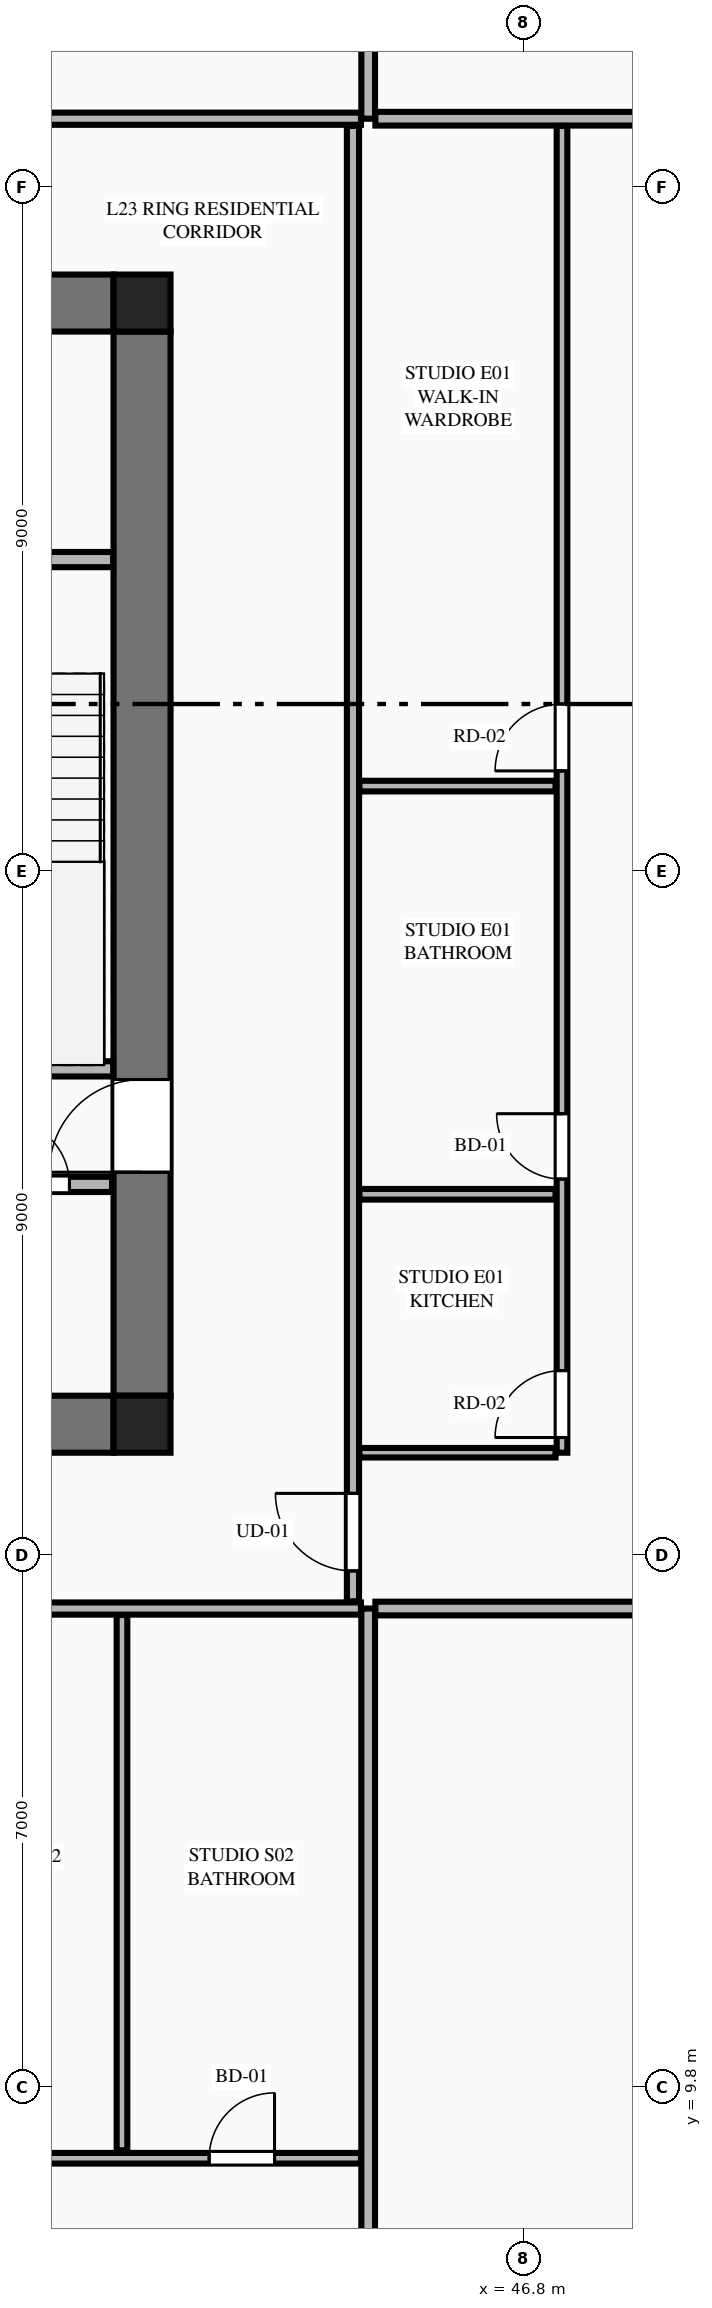
"""IFC4 building model, lengths in metres.
Left out: names, types, materials, properties, quantities, classifications, styles, units other than length and angle.
Written with IfcOpenShell. Run it as: python <this file> out.ifc"""

import sys

from ifc_helpers import new_model, si_unit, direction, frame, frame_2d, origin, origin_2d, place, context, subcontext, project, spatial, rectangle, extrude, element, fill, save


model = new_model("IFC4")
c1 = context("Model", 3, precision=1e-05, world=origin(), true_north=direction((0.0, 1.0)))
c2 = subcontext(c1, "Body", "Model", "MODEL_VIEW")
j1 = project(units=[si_unit("LENGTHUNIT", "METRE"), si_unit("PLANEANGLEUNIT", "RADIAN")], contexts=[c1])
p1 = place(None, origin())
s1 = spatial("IfcSite", under=j1, at=p1, CompositionType="ELEMENT")
p2 = place(p1, origin())
s2 = spatial("IfcBuilding", under=s1, at=p2, CompositionType="ELEMENT")
p3 = place(p2, frame((0.0, 0.0, 90.65)))
s3 = spatial("IfcBuildingStorey", under=s2, at=p3, CompositionType="ELEMENT", Elevation=90.65)
for number, where, z_axis, x_axis in (
    (1, (41.775, 18.525, 0.0), (0.0, 0.0, 1.0), (1.0, 0.0, 0.0)),
    (2, (41.775, 33.275, 0.0), (0.0, 0.0, 1.0), (1.0, 0.0, 0.0)),
):
    element("IfcColumn", number, at=place(p3, frame(where, z_axis=z_axis, x_axis=x_axis)), inside=s3, PredefinedType="COLUMN", context=c2, shape_type="SweptSolid", body=[
        extrude(rectangle(XDim=0.75, YDim=0.75, at=origin_2d()), origin(), (0.0, 0.0, 1.0), 3.55),
    ])
for number, where, z_axis, x_axis in (
    (3, (23.4, 18.525, 0.0), (0.0, 0.0, 1.0), (1.0, 0.0, 0.0)),
    (4, (23.4, 33.275, 0.0), (0.0, 0.0, 1.0), (1.0, 0.0, 0.0)),
):
    element("IfcWall", number, at=place(p3, frame(where, z_axis=z_axis, x_axis=x_axis)), inside=s3, PredefinedType="SHEAR", context=c2, shape_type="SweptSolid", body=[
        extrude(rectangle(XDim=18.0, YDim=0.75, at=frame_2d((9.0, 0.0))), origin(), (0.0, 0.0, 1.0), 3.33),
    ])
p4 = place(p3, frame((41.775, 18.9, 0.0), z_axis=(0.0, 0.0, 1.0), x_axis=(0.0, 1.0, 0.0)))
e5 = element("IfcWall", 5, at=p4, inside=s3, PredefinedType="SHEAR", context=c2, shape_type="SweptSolid", body=[
    extrude(rectangle(XDim=14.0, YDim=0.75, at=frame_2d((7.0, 0.0))), origin(), (0.0, 0.0, 1.0), 3.33),
])
p5 = place(p4, frame((2.94, 0.0, 0.0)))
e6 = element("IfcOpeningElement", 6, at=p5, cuts=e5, PredefinedType="OPENING", context=c2, shape_type="SweptSolid", body=[
    extrude(rectangle(XDim=1.22, YDim=2.25, at=frame_2d((0.61, 1.125))), frame((0.0, 0.385, 0.0), z_axis=(0.0, -1.0, 0.0), x_axis=(1.0, 0.0, 0.0)), (0.0, 0.0, 1.0), 0.77),
])
p6 = place(p3, frame((38.125, 23.2, 0.0), z_axis=(0.0, 0.0, 1.0), x_axis=(1.0, 0.0, 0.0)))
e7 = element("IfcWall", 7, at=p6, inside=s3, PredefinedType="PLUMBINGWALL", context=c2, shape_type="SweptSolid", body=[
    extrude(rectangle(XDim=3.27, YDim=0.2, at=frame_2d((1.635, 0.0))), origin(), (0.0, 0.0, 1.0), 3.33),
])
p7 = place(p3, frame((38.125, 29.9, 0.0), z_axis=(0.0, 0.0, 1.0), x_axis=(1.0, 0.0, 0.0)))
e8 = element("IfcWall", 8, at=p7, inside=s3, PredefinedType="PLUMBINGWALL", context=c2, shape_type="SweptSolid", body=[
    extrude(rectangle(XDim=3.27, YDim=0.2, at=frame_2d((1.635, 0.0))), origin(), (0.0, 0.0, 1.0), 3.33),
])
p8 = place(p7, frame((0.5, 0.0, 0.0)))
e9 = element("IfcOpeningElement", 9, at=p8, cuts=e8, PredefinedType="OPENING", context=c2, shape_type="SweptSolid", body=[
    extrude(rectangle(XDim=0.85, YDim=2.05, at=frame_2d((0.425, 1.025))), frame((0.0, 0.11, 0.0), z_axis=(0.0, -1.0, 0.0), x_axis=(1.0, 0.0, 0.0)), (0.0, 0.0, 1.0), 0.22),
])
p9 = place(p3, frame((23.42, 21.68, 0.0), z_axis=(0.0, 0.0, 1.0), x_axis=(1.0, 0.0, 0.0)))
e10 = element("IfcWall", 10, at=p9, inside=s3, PredefinedType="PLUMBINGWALL", context=c2, shape_type="SweptSolid", body=[
    extrude(rectangle(XDim=17.96, YDim=0.2, at=frame_2d((8.98, 0.0))), origin(), (0.0, 0.0, 1.0), 3.33),
])
p10 = place(p9, frame((4.45, 0.0, 0.0)))
e11 = element("IfcOpeningElement", 11, at=p10, cuts=e10, PredefinedType="OPENING", context=c2, shape_type="SweptSolid", body=[
    extrude(rectangle(XDim=1.1, YDim=2.2, at=frame_2d((0.55, 1.1))), frame((0.0, 0.11, 0.0), z_axis=(0.0, -1.0, 0.0), x_axis=(1.0, 0.0, 0.0)), (0.0, 0.0, 1.0), 0.22),
])
p11 = place(p9, frame((6.85, 0.0, 0.0)))
e12 = element("IfcOpeningElement", 12, at=p11, cuts=e10, PredefinedType="OPENING", context=c2, shape_type="SweptSolid", body=[
    extrude(rectangle(XDim=1.1, YDim=2.2, at=frame_2d((0.55, 1.1))), frame((0.0, 0.11, 0.0), z_axis=(0.0, -1.0, 0.0), x_axis=(1.0, 0.0, 0.0)), (0.0, 0.0, 1.0), 0.22),
])
p12 = place(p9, frame((9.25, 0.0, 0.0)))
e13 = element("IfcOpeningElement", 13, at=p12, cuts=e10, PredefinedType="OPENING", context=c2, shape_type="SweptSolid", body=[
    extrude(rectangle(XDim=1.1, YDim=2.2, at=frame_2d((0.55, 1.1))), frame((0.0, 0.11, 0.0), z_axis=(0.0, -1.0, 0.0), x_axis=(1.0, 0.0, 0.0)), (0.0, 0.0, 1.0), 0.22),
])
p13 = place(p9, frame((0.2, 0.0, 0.0)))
e14 = element("IfcOpeningElement", 14, at=p13, cuts=e10, PredefinedType="OPENING", context=c2, shape_type="SweptSolid", body=[
    extrude(rectangle(XDim=0.85, YDim=2.05, at=frame_2d((0.425, 1.025))), frame((0.0, 0.11, 0.0), z_axis=(0.0, -1.0, 0.0), x_axis=(1.0, 0.0, 0.0)), (0.0, 0.0, 1.0), 0.22),
])
p14 = place(p9, frame((2.05, 0.0, 0.0)))
e15 = element("IfcOpeningElement", 15, at=p14, cuts=e10, PredefinedType="OPENING", context=c2, shape_type="SweptSolid", body=[
    extrude(rectangle(XDim=0.85, YDim=2.05, at=frame_2d((0.425, 1.025))), frame((0.0, 0.11, 0.0), z_axis=(0.0, -1.0, 0.0), x_axis=(1.0, 0.0, 0.0)), (0.0, 0.0, 1.0), 0.22),
])
p15 = place(p9, frame((13.5, 0.0, 0.0)))
e16 = element("IfcOpeningElement", 16, at=p15, cuts=e10, PredefinedType="OPENING", context=c2, shape_type="SweptSolid", body=[
    extrude(rectangle(XDim=0.85, YDim=2.05, at=frame_2d((0.425, 1.025))), frame((0.0, 0.11, 0.0), z_axis=(0.0, -1.0, 0.0), x_axis=(1.0, 0.0, 0.0)), (0.0, 0.0, 1.0), 0.22),
])
p16 = place(p9, frame((15.05, 0.0, 0.0)))
e17 = element("IfcOpeningElement", 17, at=p16, cuts=e10, PredefinedType="OPENING", context=c2, shape_type="SweptSolid", body=[
    extrude(rectangle(XDim=0.85, YDim=2.05, at=frame_2d((0.425, 1.025))), frame((0.0, 0.11, 0.0), z_axis=(0.0, -1.0, 0.0), x_axis=(1.0, 0.0, 0.0)), (0.0, 0.0, 1.0), 0.22),
])
p17 = place(p9, frame((16.55, 0.0, 0.0)))
e18 = element("IfcOpeningElement", 18, at=p17, cuts=e10, PredefinedType="OPENING", context=c2, shape_type="SweptSolid", body=[
    extrude(rectangle(XDim=0.85, YDim=2.05, at=frame_2d((0.425, 1.025))), frame((0.0, 0.11, 0.0), z_axis=(0.0, -1.0, 0.0), x_axis=(1.0, 0.0, 0.0)), (0.0, 0.0, 1.0), 0.22),
])
p18 = place(p3, frame((44.75, 2.455, 0.0), z_axis=(0.0, 0.0, 1.0), x_axis=(0.0, 1.0, 0.0)))
e19 = element("IfcWall", 19, at=p18, inside=s3, PredefinedType="PARTITIONING", context=c2, shape_type="SweptSolid", body=[
    extrude(rectangle(XDim=13.645, YDim=0.18, at=frame_2d((6.823, 0.0))), origin(), (0.0, 0.0, 1.0), 3.33),
])
p19 = place(p3, frame((36.617, 16.1, 0.0), z_axis=(0.0, 0.0, 1.0), x_axis=(1.0, 0.0, 0.0)))
e20 = element("IfcWall", 20, at=p19, inside=s3, PredefinedType="PARTITIONING", context=c2, shape_type="SweptSolid", body=[
    extrude(rectangle(XDim=8.038, YDim=0.16, at=frame_2d((4.019, 0.0))), origin(), (0.0, 0.0, 1.0), 3.33),
])
p20 = place(p19, frame((0.355, 0.0, 0.0)))
e21 = element("IfcOpeningElement", 21, at=p20, cuts=e20, PredefinedType="OPENING", context=c2, shape_type="SweptSolid", body=[
    extrude(rectangle(XDim=1.02, YDim=2.25, at=frame_2d((0.51, 1.125))), frame((0.0, 0.09, 0.0), z_axis=(0.0, -1.0, 0.0), x_axis=(1.0, 0.0, 0.0)), (0.0, 0.0, 1.0), 0.18),
])
p21 = place(p3, frame((38.522, 8.868, 0.0), z_axis=(0.0, 0.0, 1.0), x_axis=(1.0, 0.0, 0.0)))
e22 = element("IfcWall", 22, at=p21, inside=s3, PredefinedType="PLUMBINGWALL", context=c2, shape_type="SweptSolid", body=[
    extrude(rectangle(XDim=6.133, YDim=0.14, at=frame_2d((3.066, 0.0))), origin(), (0.0, 0.0, 1.0), 3.33),
])
p22 = place(p21, frame((4.136, 0.0, 0.0)))
e23 = element("IfcOpeningElement", 23, at=p22, cuts=e22, PredefinedType="OPENING", context=c2, shape_type="SweptSolid", body=[
    extrude(rectangle(XDim=0.86, YDim=2.1, at=frame_2d((0.43, 1.05))), frame((0.0, 0.08, 0.0), z_axis=(0.0, -1.0, 0.0), x_axis=(1.0, 0.0, 0.0)), (0.0, 0.0, 1.0), 0.16),
])
p23 = place(p21, frame((0.22, 0.0, 0.0)))
e24 = element("IfcOpeningElement", 24, at=p23, cuts=e22, PredefinedType="OPENING", context=c2, shape_type="SweptSolid", body=[
    extrude(rectangle(XDim=0.88, YDim=2.15, at=frame_2d((0.44, 1.075))), frame((0.0, 0.08, 0.0), z_axis=(0.0, -1.0, 0.0), x_axis=(1.0, 0.0, 0.0)), (0.0, 0.0, 1.0), 0.16),
])
p24 = place(p3, frame((41.511, 8.973, 0.0), z_axis=(0.0, 0.0, 1.0), x_axis=(0.0, 1.0, 0.0)))
e25 = element("IfcWall", 25, at=p24, inside=s3, PredefinedType="PLUMBINGWALL", context=c2, shape_type="SweptSolid", body=[
    extrude(rectangle(XDim=7.042, YDim=0.14, at=frame_2d((3.521, 0.0))), origin(), (0.0, 0.0, 1.0), 3.33),
])
p25 = place(p3, frame((44.75, 35.7, 0.0), z_axis=(0.0, 0.0, 1.0), x_axis=(0.0, 1.0, 0.0)))
e26 = element("IfcWall", 26, at=p25, inside=s3, PredefinedType="PARTITIONING", context=c2, shape_type="SweptSolid", body=[
    extrude(rectangle(XDim=13.445, YDim=0.18, at=frame_2d((6.723, 0.0))), origin(), (0.0, 0.0, 1.0), 3.33),
])
p26 = place(p3, frame((20.145, 35.7, 0.0), z_axis=(0.0, 0.0, 1.0), x_axis=(1.0, 0.0, 0.0)))
e27 = element("IfcWall", 27, at=p26, inside=s3, PredefinedType="PARTITIONING", context=c2, shape_type="SweptSolid", body=[
    extrude(rectangle(XDim=24.51, YDim=0.16, at=frame_2d((12.255, 0.0))), origin(), (0.0, 0.0, 1.0), 3.33),
])
p27 = place(p26, frame((0.705, 0.0, 0.0)))
e28 = element("IfcOpeningElement", 28, at=p27, cuts=e27, PredefinedType="OPENING", context=c2, shape_type="SweptSolid", body=[
    extrude(rectangle(XDim=1.02, YDim=2.25, at=frame_2d((0.51, 1.125))), frame((0.0, 0.09, 0.0), z_axis=(0.0, -1.0, 0.0), x_axis=(1.0, 0.0, 0.0)), (0.0, 0.0, 1.0), 0.18),
])
p28 = place(p3, frame((44.845, 16.1, 0.0), z_axis=(0.0, 0.0, 1.0), x_axis=(1.0, 0.0, 0.0)))
e29 = element("IfcWall", 29, at=p28, inside=s3, PredefinedType="PARTITIONING", context=c2, shape_type="SweptSolid", body=[
    extrude(rectangle(XDim=9.467, YDim=0.18, at=frame_2d((4.733, 0.0))), origin(), (0.0, 0.0, 1.0), 3.33),
])
p29 = place(p3, frame((44.845, 35.7, 0.0), z_axis=(0.0, 0.0, 1.0), x_axis=(1.0, 0.0, 0.0)))
e30 = element("IfcWall", 30, at=p29, inside=s3, PredefinedType="PARTITIONING", context=c2, shape_type="SweptSolid", body=[
    extrude(rectangle(XDim=9.366, YDim=0.18, at=frame_2d((4.683, 0.0))), origin(), (0.0, 0.0, 1.0), 3.33),
])
p30 = place(p3, frame((44.55, 16.195, 0.0), z_axis=(0.0, 0.0, 1.0), x_axis=(0.0, 1.0, 0.0)))
e31 = element("IfcWall", 31, at=p30, inside=s3, PredefinedType="PARTITIONING", context=c2, shape_type="SweptSolid", body=[
    extrude(rectangle(XDim=19.41, YDim=0.16, at=frame_2d((9.705, 0.0))), origin(), (0.0, 0.0, 1.0), 2.637),
])
p31 = place(p30, frame((0.4, 0.0, 0.0)))
e32 = element("IfcOpeningElement", 32, at=p31, cuts=e31, PredefinedType="OPENING", context=c2, shape_type="SweptSolid", body=[
    extrude(rectangle(XDim=1.02, YDim=2.25, at=frame_2d((0.51, 1.125))), frame((0.0, 0.09, 0.0), z_axis=(0.0, -1.0, 0.0), x_axis=(1.0, 0.0, 0.0)), (0.0, 0.0, 1.0), 0.18),
])
p32 = place(p3, frame((44.635, 18.15, 0.0), z_axis=(0.0, 0.0, 1.0), x_axis=(1.0, 0.0, 0.0)))
e33 = element("IfcWall", 33, at=p32, inside=s3, PredefinedType="PARTITIONING", context=c2, shape_type="SweptSolid", body=[
    extrude(rectangle(XDim=2.58, YDim=0.125, at=frame_2d((1.29, 0.0))), origin(), (0.0, 0.0, 1.0), 2.637),
])
p33 = place(p3, frame((47.3, 18.15, 0.0), z_axis=(0.0, 0.0, 1.0), x_axis=(0.0, 1.0, 0.0)))
e34 = element("IfcWall", 34, at=p33, inside=s3, PredefinedType="PLUMBINGWALL", context=c2, shape_type="SweptSolid", body=[
    extrude(rectangle(XDim=17.455, YDim=0.14, at=frame_2d((8.728, 0.0))), origin(), (0.0, 0.0, 1.0), 3.33),
])
p34 = place(p33, frame((3.6, 0.0, 0.0)))
e35 = element("IfcOpeningElement", 35, at=p34, cuts=e34, PredefinedType="OPENING", context=c2, shape_type="SweptSolid", body=[
    extrude(rectangle(XDim=0.86, YDim=2.1, at=frame_2d((0.43, 1.05))), frame((0.0, 0.08, 0.0), z_axis=(0.0, -1.0, 0.0), x_axis=(1.0, 0.0, 0.0)), (0.0, 0.0, 1.0), 0.16),
])
p35 = place(p33, frame((8.97, 0.0, 0.0)))
e36 = element("IfcOpeningElement", 36, at=p35, cuts=e34, PredefinedType="OPENING", context=c2, shape_type="SweptSolid", body=[
    extrude(rectangle(XDim=0.88, YDim=2.15, at=frame_2d((0.44, 1.075))), frame((0.0, 0.08, 0.0), z_axis=(0.0, -1.0, 0.0), x_axis=(1.0, 0.0, 0.0)), (0.0, 0.0, 1.0), 0.16),
])
p36 = place(p33, frame((0.2, 0.0, 0.0)))
e37 = element("IfcOpeningElement", 37, at=p36, cuts=e34, PredefinedType="OPENING", context=c2, shape_type="SweptSolid", body=[
    extrude(rectangle(XDim=0.88, YDim=2.15, at=frame_2d((0.44, 1.075))), frame((0.0, 0.08, 0.0), z_axis=(0.0, -1.0, 0.0), x_axis=(1.0, 0.0, 0.0)), (0.0, 0.0, 1.0), 0.16),
])
for number, where, z_axis, x_axis in (
    (38, (44.635, 21.55, 0.0), (0.0, 0.0, 1.0), (1.0, 0.0, 0.0)),
    (39, (44.635, 26.92, 0.0), (0.0, 0.0, 1.0), (1.0, 0.0, 0.0)),
):
    element("IfcWall", number, at=place(p3, frame(where, z_axis=z_axis, x_axis=x_axis)), inside=s3, PredefinedType="PLUMBINGWALL", context=c2, shape_type="SweptSolid", body=[
        extrude(rectangle(XDim=2.58, YDim=0.14, at=frame_2d((1.29, 0.0))), origin(), (0.0, 0.0, 1.0), 3.33),
    ])
p37 = place(p5, origin())
e40 = element("IfcDoor", 40, at=p37, inside=s3, OperationType="SINGLE_SWING_LEFT", PredefinedType="DOOR", context=c2, shape_type="SweptSolid", body=[
    extrude(rectangle(XDim=1.22, YDim=2.25, at=frame_2d((0.61, 1.125))), frame((0.0, 0.025, 0.0), z_axis=(0.0, -1.0, 0.0), x_axis=(1.0, 0.0, 0.0)), (0.0, 0.0, 1.0), 0.05),
])
fill(e6, e40)
p38 = place(p17, origin())
e41 = element("IfcDoor", 41, at=p38, inside=s3, OperationType="SINGLE_SWING_LEFT", PredefinedType="DOOR", context=c2, shape_type="SweptSolid", body=[
    extrude(rectangle(XDim=0.85, YDim=2.05, at=frame_2d((0.425, 1.025))), frame((0.0, 0.025, 0.0), z_axis=(0.0, -1.0, 0.0), x_axis=(1.0, 0.0, 0.0)), (0.0, 0.0, 1.0), 0.05),
])
fill(e18, e41)
p39 = place(p22, origin())
e42 = element("IfcDoor", 42, at=p39, inside=s3, OperationType="SINGLE_SWING_RIGHT", PredefinedType="DOOR", context=c2, shape_type="SweptSolid", body=[
    extrude(rectangle(XDim=0.86, YDim=2.1, at=frame_2d((0.43, 1.05))), frame((0.0, 0.025, 0.0), z_axis=(0.0, -1.0, 0.0), x_axis=(1.0, 0.0, 0.0)), (0.0, 0.0, 1.0), 0.05),
])
fill(e23, e42)
p40 = place(p34, origin())
e43 = element("IfcDoor", 43, at=p40, inside=s3, OperationType="SINGLE_SWING_RIGHT", PredefinedType="DOOR", context=c2, shape_type="SweptSolid", body=[
    extrude(rectangle(XDim=0.86, YDim=2.1, at=frame_2d((0.43, 1.05))), frame((0.0, 0.025, 0.0), z_axis=(0.0, -1.0, 0.0), x_axis=(1.0, 0.0, 0.0)), (0.0, 0.0, 1.0), 0.05),
])
fill(e35, e43)
p41 = place(p35, origin())
e44 = element("IfcDoor", 44, at=p41, inside=s3, OperationType="SINGLE_SWING_LEFT", PredefinedType="DOOR", context=c2, shape_type="SweptSolid", body=[
    extrude(rectangle(XDim=0.88, YDim=2.15, at=frame_2d((0.44, 1.075))), frame((0.0, 0.025, 0.0), z_axis=(0.0, -1.0, 0.0), x_axis=(1.0, 0.0, 0.0)), (0.0, 0.0, 1.0), 0.05),
])
fill(e36, e44)
p42 = place(p31, origin())
e45 = element("IfcDoor", 45, at=p42, inside=s3, OperationType="SINGLE_SWING_RIGHT", PredefinedType="DOOR", context=c2, shape_type="SweptSolid", body=[
    extrude(rectangle(XDim=1.02, YDim=2.25, at=frame_2d((0.51, 1.125))), frame((0.0, 0.025, 0.0), z_axis=(0.0, -1.0, 0.0), x_axis=(1.0, 0.0, 0.0)), (0.0, 0.0, 1.0), 0.05),
])
fill(e32, e45)
p43 = place(p36, origin())
e46 = element("IfcDoor", 46, at=p43, inside=s3, OperationType="SINGLE_SWING_LEFT", PredefinedType="DOOR", context=c2, shape_type="SweptSolid", body=[
    extrude(rectangle(XDim=0.88, YDim=2.15, at=frame_2d((0.44, 1.075))), frame((0.0, 0.025, 0.0), z_axis=(0.0, -1.0, 0.0), x_axis=(1.0, 0.0, 0.0)), (0.0, 0.0, 1.0), 0.05),
])
fill(e37, e46)
save(model, sys.argv[1])
